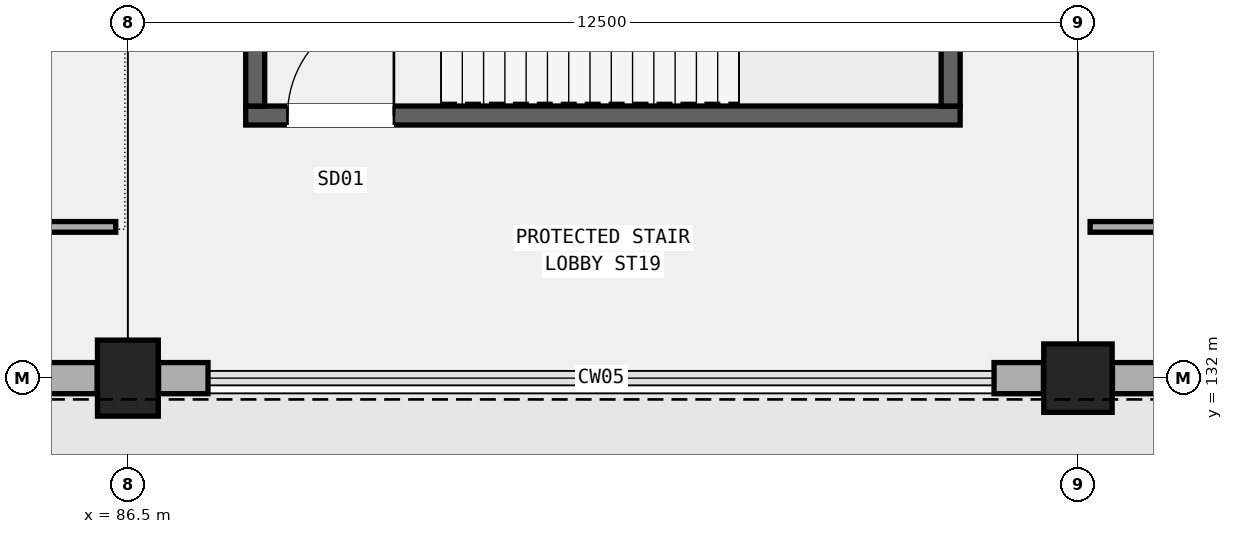
"""IFC4 building model, lengths in metres.
Left out: names, types, materials, properties, quantities, classifications, styles, units other than length and angle.
Written with IfcOpenShell. Run it as: python <this file> out.ifc"""

import sys

from ifc_helpers import new_model, si_unit, direction, frame, frame_2d, origin, origin_2d, place, context, subcontext, project, spatial, rectangle, extrude, element, fill, save


model = new_model("IFC4")
c1 = context("Model", 3, precision=1e-05, world=origin(), true_north=direction((0.0, 1.0)))
c2 = subcontext(c1, "Body", "Model", "MODEL_VIEW")
j1 = project(units=[si_unit("LENGTHUNIT", "METRE"), si_unit("PLANEANGLEUNIT", "RADIAN")], contexts=[c1])
p1 = place(None, origin())
s1 = spatial("IfcSite", under=j1, at=p1, CompositionType="ELEMENT")
p2 = place(p1, origin())
s2 = spatial("IfcBuilding", under=s1, at=p2, CompositionType="ELEMENT")
p3 = place(p2, frame((0.0, 0.0, 5.4)))
s3 = spatial("IfcBuildingStorey", under=s2, at=p3, CompositionType="ELEMENT", Elevation=5.4)
p4 = place(p3, frame((86.5, 132.0, 0.0), z_axis=(0.0, 0.0, 1.0), x_axis=(1.0, 0.0, 0.0)))
e1 = element("IfcColumn", 1, at=p4, inside=s3, PredefinedType="COLUMN", context=c2, shape_type="SweptSolid", body=[
    extrude(rectangle(XDim=0.8, YDim=1.0, at=origin_2d()), origin(), (0.0, 0.0, 1.0), 4.8),
])
p5 = place(p3, frame((99.0, 132.0, 0.0), z_axis=(0.0, 0.0, 1.0), x_axis=(1.0, 0.0, 0.0)))
e2 = element("IfcColumn", 2, at=p5, inside=s3, PredefinedType="COLUMN", context=c2, shape_type="SweptSolid", body=[
    extrude(rectangle(XDim=0.9, YDim=0.9, at=origin_2d()), origin(), (0.0, 0.0, 1.0), 4.8),
])
p6 = place(p3, frame((85.446, 132.0, 0.0), z_axis=(0.0, 0.0, 1.0), x_axis=(1.0, 0.0, 0.0)))
e3 = element("IfcWall", 3, at=p6, inside=s3, PredefinedType="SOLIDWALL", context=c2, shape_type="SweptSolid", body=[
    extrude(rectangle(XDim=0.65, YDim=0.41, at=frame_2d((0.325, 0.0))), origin(), (0.0, 0.0, 1.0), 4.2),
])
for number, where, z_axis, x_axis in (
    (4, (86.904, 132.0, 0.0), (0.0, 0.0, 1.0), (1.0, 0.0, 0.0)),
    (5, (97.896, 132.0, 0.0), (0.0, 0.0, 1.0), (1.0, 0.0, 0.0)),
):
    element("IfcWall", number, at=place(p3, frame(where, z_axis=z_axis, x_axis=x_axis)), inside=s3, PredefinedType="SOLIDWALL", context=c2, shape_type="SweptSolid", body=[
        extrude(rectangle(XDim=0.65, YDim=0.41, at=frame_2d((0.325, 0.0))), origin(), (0.0, 0.0, 1.0), 4.15),
    ])
p7 = place(p3, frame((99.454, 132.0, 0.0), z_axis=(0.0, 0.0, 1.0), x_axis=(1.0, 0.0, 0.0)))
e6 = element("IfcWall", 6, at=p7, inside=s3, PredefinedType="SOLIDWALL", context=c2, shape_type="SweptSolid", body=[
    extrude(rectangle(XDim=0.65, YDim=0.41, at=frame_2d((0.325, 0.0))), origin(), (0.0, 0.0, 1.0), 4.2),
])
p8 = place(p3, frame((88.05, 135.455, 0.0), z_axis=(0.0, 0.0, 1.0), x_axis=(1.0, 0.0, 0.0)))
e7 = element("IfcWall", 7, at=p8, inside=s3, PredefinedType="SHEAR", context=c2, shape_type="SweptSolid", body=[
    extrude(rectangle(XDim=9.4, YDim=0.25, at=frame_2d((4.7, 0.0))), origin(), (0.0, 0.0, 1.0), 4.55),
])
p9 = place(p8, frame((0.55, 0.0, 0.0)))
e8 = element("IfcOpeningElement", 8, at=p9, cuts=e7, PredefinedType="OPENING", context=c2, shape_type="SweptSolid", body=[
    extrude(rectangle(XDim=1.4, YDim=2.15, at=frame_2d((0.7, 1.075))), frame((0.0, 0.135, 0.0), z_axis=(0.0, -1.0, 0.0), x_axis=(1.0, 0.0, 0.0)), (0.0, 0.0, 1.0), 0.27),
])
for number, where, z_axis, x_axis in (
    (9, (88.175, 135.58, 0.0), (0.0, 0.0, 1.0), (0.0, 1.0, 0.0)),
    (10, (97.325, 135.58, 0.0), (0.0, 0.0, 1.0), (0.0, 1.0, 0.0)),
):
    element("IfcWall", number, at=place(p3, frame(where, z_axis=z_axis, x_axis=x_axis)), inside=s3, PredefinedType="SHEAR", context=c2, shape_type="SweptSolid", body=[
        extrude(rectangle(XDim=4.84, YDim=0.25, at=frame_2d((2.42, 0.0))), origin(), (0.0, 0.0, 1.0), 4.55),
    ])
p10 = place(p3, frame((74.16, 133.99, 0.0), z_axis=(0.0, 0.0, 1.0), x_axis=(1.0, 0.0, 0.0)))
e11 = element("IfcWall", 11, at=p10, inside=s3, PredefinedType="PARTITIONING", context=c2, shape_type="SweptSolid", body=[
    extrude(rectangle(XDim=12.18, YDim=0.14, at=frame_2d((6.09, 0.0))), origin(), (0.0, 0.0, 1.0), 3.92),
])
p11 = place(p10, frame((2.386, 0.0, 0.0)))
e12 = element("IfcOpeningElement", 12, at=p11, cuts=e11, PredefinedType="OPENING", context=c2, shape_type="SweptSolid", body=[
    extrude(rectangle(XDim=1.36, YDim=2.25, at=frame_2d((0.68, 1.125))), frame((0.0, 0.08, 0.0), z_axis=(0.0, -1.0, 0.0), x_axis=(1.0, 0.0, 0.0)), (0.0, 0.0, 1.0), 0.16),
])
p12 = place(p10, frame((8.536, 0.0, 0.0)))
e13 = element("IfcOpeningElement", 13, at=p12, cuts=e11, PredefinedType="OPENING", context=c2, shape_type="SweptSolid", body=[
    extrude(rectangle(XDim=1.4, YDim=2.24, at=frame_2d((0.7, 1.12))), frame((0.0, 0.08, 0.0), z_axis=(0.0, -1.0, 0.0), x_axis=(1.0, 0.0, 0.0)), (0.0, 0.0, 1.0), 0.16),
])
p13 = place(p3, frame((99.16, 133.99, 0.0), z_axis=(0.0, 0.0, 1.0), x_axis=(1.0, 0.0, 0.0)))
e14 = element("IfcWall", 14, at=p13, inside=s3, PredefinedType="PARTITIONING", context=c2, shape_type="SweptSolid", body=[
    extrude(rectangle(XDim=12.68, YDim=0.14, at=frame_2d((6.34, 0.0))), origin(), (0.0, 0.0, 1.0), 3.92),
])
p14 = place(p13, frame((5.515, 0.0, 0.0)))
e15 = element("IfcOpeningElement", 15, at=p14, cuts=e14, PredefinedType="OPENING", context=c2, shape_type="SweptSolid", body=[
    extrude(rectangle(XDim=1.65, YDim=2.28, at=frame_2d((0.825, 1.14))), frame((0.0, 0.08, 0.0), z_axis=(0.0, -1.0, 0.0), x_axis=(1.0, 0.0, 0.0)), (0.0, 0.0, 1.0), 0.16),
])
p15 = place(p9, origin())
e16 = element("IfcDoor", 16, at=p15, inside=s3, OperationType="SINGLE_SWING_RIGHT", PredefinedType="DOOR", context=c2, shape_type="SweptSolid", body=[
    extrude(rectangle(XDim=1.4, YDim=2.15, at=frame_2d((0.7, 1.075))), frame((0.0, 0.025, 0.0), z_axis=(0.0, -1.0, 0.0), x_axis=(1.0, 0.0, 0.0)), (0.0, 0.0, 1.0), 0.05),
])
fill(e8, e16)
save(model, sys.argv[1])
